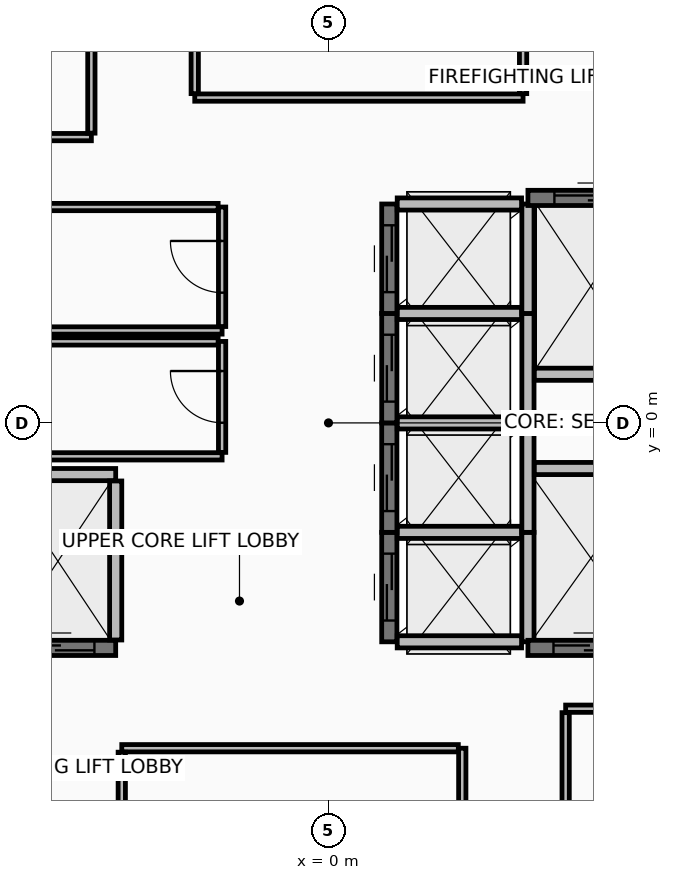
"""IFC4 building model, lengths in metres.
Left out: names, types, materials, properties, quantities, classifications, styles, units other than length and angle.
Written with IfcOpenShell. Run it as: python <this file> out.ifc"""

import sys

from ifc_helpers import new_model, si_unit, direction, frame, frame_2d, origin, place, context, subcontext, project, spatial, rectangle, extrude, element, fill, save


model = new_model("IFC4")
c1 = context("Model", 3, precision=1e-05, world=origin(), true_north=direction((0.0, 1.0)))
c2 = subcontext(c1, "Body", "Model", "MODEL_VIEW")
j1 = project(units=[si_unit("LENGTHUNIT", "METRE"), si_unit("PLANEANGLEUNIT", "RADIAN")], contexts=[c1])
p1 = place(None, origin())
s1 = spatial("IfcSite", under=j1, at=p1, CompositionType="ELEMENT")
p2 = place(p1, origin())
s2 = spatial("IfcBuilding", under=s1, at=p2, CompositionType="ELEMENT")
p3 = place(p2, frame((0.0, 0.0, 237.85)))
s3 = spatial("IfcBuildingStorey", under=s2, at=p3, CompositionType="ELEMENT", Elevation=237.85)
p4 = place(p3, frame((1.0, -3.6, 0.0), z_axis=(0.0, 0.0, 1.0), x_axis=(0.0, 1.0, 0.0)))
e1 = element("IfcWall", 1, at=p4, inside=s3, PredefinedType="SHEAR", context=c2, shape_type="SweptSolid", body=[
    extrude(rectangle(XDim=1.8, YDim=0.25, at=frame_2d((0.9, 0.0))), origin(), (0.0, 0.0, 1.0), 3.42),
])
p5 = place(p4, frame((0.35, 0.0, 0.0)))
e2 = element("IfcOpeningElement", 2, at=p5, cuts=e1, PredefinedType="OPENING", context=c2, shape_type="SweptSolid", body=[
    extrude(rectangle(XDim=1.1, YDim=2.2, at=frame_2d((0.55, 1.1))), frame((0.0, 0.135, 0.0), z_axis=(0.0, -1.0, 0.0), x_axis=(1.0, 0.0, 0.0)), (0.0, 0.0, 1.0), 0.27),
])
p6 = place(p3, frame((3.28, -3.6, 0.0), z_axis=(0.0, 0.0, 1.0), x_axis=(0.0, 1.0, 0.0)))
e3 = element("IfcWall", 3, at=p6, inside=s3, PredefinedType="PARTITIONING", context=c2, shape_type="SweptSolid", body=[
    extrude(rectangle(XDim=1.8, YDim=0.2, at=frame_2d((0.9, 0.0))), origin(), (0.0, 0.0, 1.0), 3.42),
])
for number, where, z_axis, x_axis in (
    (4, (1.13, -3.6, 0.0), (0.0, 0.0, 1.0), (1.0, 0.0, 0.0)),
    (5, (1.13, -1.8, 0.0), (0.0, 0.0, 1.0), (1.0, 0.0, 0.0)),
):
    element("IfcWall", number, at=place(p3, frame(where, z_axis=z_axis, x_axis=x_axis)), inside=s3, PredefinedType="PARTITIONING", context=c2, shape_type="SweptSolid", body=[
        extrude(rectangle(XDim=2.045, YDim=0.2, at=frame_2d((1.022, 0.0))), origin(), (0.0, 0.0, 1.0), 3.42),
    ])
p7 = place(p3, frame((1.0, -1.8, 0.0), z_axis=(0.0, 0.0, 1.0), x_axis=(0.0, 1.0, 0.0)))
e6 = element("IfcWall", 6, at=p7, inside=s3, PredefinedType="SHEAR", context=c2, shape_type="SweptSolid", body=[
    extrude(rectangle(XDim=1.8, YDim=0.25, at=frame_2d((0.9, 0.0))), origin(), (0.0, 0.0, 1.0), 3.42),
])
p8 = place(p7, frame((0.35, 0.0, 0.0)))
e7 = element("IfcOpeningElement", 7, at=p8, cuts=e6, PredefinedType="OPENING", context=c2, shape_type="SweptSolid", body=[
    extrude(rectangle(XDim=1.1, YDim=2.2, at=frame_2d((0.55, 1.1))), frame((0.0, 0.135, 0.0), z_axis=(0.0, -1.0, 0.0), x_axis=(1.0, 0.0, 0.0)), (0.0, 0.0, 1.0), 0.27),
])
p9 = place(p3, frame((3.28, -1.8, 0.0), z_axis=(0.0, 0.0, 1.0), x_axis=(0.0, 1.0, 0.0)))
e8 = element("IfcWall", 8, at=p9, inside=s3, PredefinedType="PARTITIONING", context=c2, shape_type="SweptSolid", body=[
    extrude(rectangle(XDim=1.8, YDim=0.2, at=frame_2d((0.9, 0.0))), origin(), (0.0, 0.0, 1.0), 3.42),
])
p10 = place(p3, frame((1.13, 0.0, 0.0), z_axis=(0.0, 0.0, 1.0), x_axis=(1.0, 0.0, 0.0)))
e9 = element("IfcWall", 9, at=p10, inside=s3, PredefinedType="PARTITIONING", context=c2, shape_type="SweptSolid", body=[
    extrude(rectangle(XDim=2.045, YDim=0.2, at=frame_2d((1.022, 0.0))), origin(), (0.0, 0.0, 1.0), 3.42),
])
p11 = place(p3, frame((1.0, 0.0, 0.0), z_axis=(0.0, 0.0, 1.0), x_axis=(0.0, 1.0, 0.0)))
e10 = element("IfcWall", 10, at=p11, inside=s3, PredefinedType="SHEAR", context=c2, shape_type="SweptSolid", body=[
    extrude(rectangle(XDim=1.8, YDim=0.25, at=frame_2d((0.9, 0.0))), origin(), (0.0, 0.0, 1.0), 3.42),
])
p12 = place(p11, frame((0.35, 0.0, 0.0)))
e11 = element("IfcOpeningElement", 11, at=p12, cuts=e10, PredefinedType="OPENING", context=c2, shape_type="SweptSolid", body=[
    extrude(rectangle(XDim=1.1, YDim=2.2, at=frame_2d((0.55, 1.1))), frame((0.0, 0.135, 0.0), z_axis=(0.0, -1.0, 0.0), x_axis=(1.0, 0.0, 0.0)), (0.0, 0.0, 1.0), 0.27),
])
p13 = place(p3, frame((3.28, 0.0, 0.0), z_axis=(0.0, 0.0, 1.0), x_axis=(0.0, 1.0, 0.0)))
e12 = element("IfcWall", 12, at=p13, inside=s3, PredefinedType="PARTITIONING", context=c2, shape_type="SweptSolid", body=[
    extrude(rectangle(XDim=1.8, YDim=0.2, at=frame_2d((0.9, 0.0))), origin(), (0.0, 0.0, 1.0), 3.42),
])
p14 = place(p3, frame((1.13, 1.8, 0.0), z_axis=(0.0, 0.0, 1.0), x_axis=(1.0, 0.0, 0.0)))
e13 = element("IfcWall", 13, at=p14, inside=s3, PredefinedType="PARTITIONING", context=c2, shape_type="SweptSolid", body=[
    extrude(rectangle(XDim=2.045, YDim=0.2, at=frame_2d((1.022, 0.0))), origin(), (0.0, 0.0, 1.0), 3.42),
])
p15 = place(p3, frame((1.0, 1.8, 0.0), z_axis=(0.0, 0.0, 1.0), x_axis=(0.0, 1.0, 0.0)))
e14 = element("IfcWall", 14, at=p15, inside=s3, PredefinedType="SHEAR", context=c2, shape_type="SweptSolid", body=[
    extrude(rectangle(XDim=1.8, YDim=0.25, at=frame_2d((0.9, 0.0))), origin(), (0.0, 0.0, 1.0), 3.42),
])
p16 = place(p15, frame((0.35, 0.0, 0.0)))
e15 = element("IfcOpeningElement", 15, at=p16, cuts=e14, PredefinedType="OPENING", context=c2, shape_type="SweptSolid", body=[
    extrude(rectangle(XDim=1.1, YDim=2.2, at=frame_2d((0.55, 1.1))), frame((0.0, 0.135, 0.0), z_axis=(0.0, -1.0, 0.0), x_axis=(1.0, 0.0, 0.0)), (0.0, 0.0, 1.0), 0.27),
])
p17 = place(p3, frame((3.28, 1.8, 0.0), z_axis=(0.0, 0.0, 1.0), x_axis=(0.0, 1.0, 0.0)))
e16 = element("IfcWall", 16, at=p17, inside=s3, PredefinedType="PARTITIONING", context=c2, shape_type="SweptSolid", body=[
    extrude(rectangle(XDim=1.8, YDim=0.2, at=frame_2d((0.9, 0.0))), origin(), (0.0, 0.0, 1.0), 3.42),
])
p18 = place(p3, frame((1.13, 3.6, 0.0), z_axis=(0.0, 0.0, 1.0), x_axis=(1.0, 0.0, 0.0)))
e17 = element("IfcWall", 17, at=p18, inside=s3, PredefinedType="PARTITIONING", context=c2, shape_type="SweptSolid", body=[
    extrude(rectangle(XDim=2.045, YDim=0.2, at=frame_2d((1.022, 0.0))), origin(), (0.0, 0.0, 1.0), 2.715),
])
p19 = place(p3, frame((-5.4, -3.7, 0.0), z_axis=(0.0, 0.0, 1.0), x_axis=(1.0, 0.0, 0.0)))
e18 = element("IfcWall", 18, at=p19, inside=s3, PredefinedType="SHEAR", context=c2, shape_type="SweptSolid", body=[
    extrude(rectangle(XDim=1.9, YDim=0.25, at=frame_2d((0.95, 0.0))), origin(), (0.0, 0.0, 1.0), 3.42),
])
p20 = place(p19, frame((0.35, 0.0, 0.0)))
e19 = element("IfcOpeningElement", 19, at=p20, cuts=e18, PredefinedType="OPENING", context=c2, shape_type="SweptSolid", body=[
    extrude(rectangle(XDim=1.2, YDim=2.2, at=frame_2d((0.6, 1.1))), frame((0.0, 0.135, 0.0), z_axis=(0.0, -1.0, 0.0), x_axis=(1.0, 0.0, 0.0)), (0.0, 0.0, 1.0), 0.27),
])
p21 = place(p3, frame((-5.27, -0.85, 0.0), z_axis=(0.0, 0.0, 1.0), x_axis=(1.0, 0.0, 0.0)))
e20 = element("IfcWall", 20, at=p21, inside=s3, PredefinedType="PARTITIONING", context=c2, shape_type="SweptSolid", body=[
    extrude(rectangle(XDim=1.77, YDim=0.2, at=frame_2d((0.885, 0.0))), origin(), (0.0, 0.0, 1.0), 3.42),
])
p22 = place(p3, frame((-3.5, -3.57, 0.0), z_axis=(0.0, 0.0, 1.0), x_axis=(0.0, 1.0, 0.0)))
e21 = element("IfcWall", 21, at=p22, inside=s3, PredefinedType="PARTITIONING", context=c2, shape_type="SweptSolid", body=[
    extrude(rectangle(XDim=2.615, YDim=0.2, at=frame_2d((1.308, 0.0))), origin(), (0.0, 0.0, 1.0), 3.42),
])
p23 = place(p3, frame((3.28, 3.7, 0.0), z_axis=(0.0, 0.0, 1.0), x_axis=(1.0, 0.0, 0.0)))
e22 = element("IfcWall", 22, at=p23, inside=s3, PredefinedType="SHEAR", context=c2, shape_type="SweptSolid", body=[
    extrude(rectangle(XDim=2.07, YDim=0.25, at=frame_2d((1.035, 0.0))), origin(), (0.0, 0.0, 1.0), 3.42),
])
p24 = place(p23, frame((0.435, 0.0, 0.0)))
e23 = element("IfcOpeningElement", 23, at=p24, cuts=e22, PredefinedType="OPENING", context=c2, shape_type="SweptSolid", body=[
    extrude(rectangle(XDim=1.2, YDim=2.2, at=frame_2d((0.6, 1.1))), frame((0.0, 0.135, 0.0), z_axis=(0.0, -1.0, 0.0), x_axis=(1.0, 0.0, 0.0)), (0.0, 0.0, 1.0), 0.27),
])
p25 = place(p3, frame((3.385, 0.8, 0.0), z_axis=(0.0, 0.0, 1.0), x_axis=(1.0, 0.0, 0.0)))
e24 = element("IfcWall", 24, at=p25, inside=s3, PredefinedType="PARTITIONING", context=c2, shape_type="SweptSolid", body=[
    extrude(rectangle(XDim=1.835, YDim=0.2, at=frame_2d((0.917, 0.0))), origin(), (0.0, 0.0, 1.0), 3.42),
])
p26 = place(p3, frame((3.28, -3.7, 0.0), z_axis=(0.0, 0.0, 1.0), x_axis=(1.0, 0.0, 0.0)))
e25 = element("IfcWall", 25, at=p26, inside=s3, PredefinedType="SHEAR", context=c2, shape_type="SweptSolid", body=[
    extrude(rectangle(XDim=1.94, YDim=0.25, at=frame_2d((0.97, 0.0))), origin(), (0.0, 0.0, 1.0), 3.42),
])
p27 = place(p26, frame((0.42, 0.0, 0.0)))
e26 = element("IfcOpeningElement", 26, at=p27, cuts=e25, PredefinedType="OPENING", context=c2, shape_type="SweptSolid", body=[
    extrude(rectangle(XDim=1.1, YDim=2.2, at=frame_2d((0.55, 1.1))), frame((0.0, 0.135, 0.0), z_axis=(0.0, -1.0, 0.0), x_axis=(1.0, 0.0, 0.0)), (0.0, 0.0, 1.0), 0.27),
])
p28 = place(p3, frame((3.385, -0.75, 0.0), z_axis=(0.0, 0.0, 1.0), x_axis=(1.0, 0.0, 0.0)))
e27 = element("IfcWall", 27, at=p28, inside=s3, PredefinedType="PARTITIONING", context=c2, shape_type="SweptSolid", body=[
    extrude(rectangle(XDim=1.835, YDim=0.2, at=frame_2d((0.917, 0.0))), origin(), (0.0, 0.0, 1.0), 3.42),
])
p29 = place(p3, frame((-5.22, 1.52, 0.0), z_axis=(0.0, 0.0, 1.0), x_axis=(1.0, 0.0, 0.0)))
e28 = element("IfcWall", 28, at=p29, inside=s3, PredefinedType="PARTITIONING", context=c2, shape_type="SweptSolid", body=[
    extrude(rectangle(XDim=3.47, YDim=0.12, at=frame_2d((1.735, 0.0))), origin(), (0.0, 0.0, 1.0), 3.42),
])
p30 = place(p3, frame((-1.75, 1.585, 0.0), z_axis=(0.0, 0.0, 1.0), x_axis=(0.0, 1.0, 0.0)))
e29 = element("IfcWall", 29, at=p30, inside=s3, PredefinedType="PARTITIONING", context=c2, shape_type="SweptSolid", body=[
    extrude(rectangle(XDim=1.965, YDim=0.12, at=frame_2d((0.982, 0.0))), origin(), (0.0, 0.0, 1.0), 3.42),
])
p31 = place(p30, frame((0.557, 0.0, 0.0)))
e30 = element("IfcOpeningElement", 30, at=p31, cuts=e29, PredefinedType="OPENING", context=c2, shape_type="SweptSolid", body=[
    extrude(rectangle(XDim=0.85, YDim=2.1, at=frame_2d((0.425, 1.05))), frame((0.0, 0.07, 0.0), z_axis=(0.0, -1.0, 0.0), x_axis=(1.0, 0.0, 0.0)), (0.0, 0.0, 1.0), 0.14),
])
p32 = place(p3, frame((-1.815, 3.55, 0.0), z_axis=(0.0, 0.0, 1.0), x_axis=(-1.0, 0.0, 0.0)))
e31 = element("IfcWall", 31, at=p32, inside=s3, PredefinedType="PARTITIONING", context=c2, shape_type="SweptSolid", body=[
    extrude(rectangle(XDim=3.405, YDim=0.12, at=frame_2d((1.703, 0.0))), origin(), (0.0, 0.0, 1.0), 3.42),
])
p33 = place(p3, frame((-5.22, -0.55, 0.0), z_axis=(0.0, 0.0, 1.0), x_axis=(1.0, 0.0, 0.0)))
e32 = element("IfcWall", 32, at=p33, inside=s3, PredefinedType="PARTITIONING", context=c2, shape_type="SweptSolid", body=[
    extrude(rectangle(XDim=3.47, YDim=0.12, at=frame_2d((1.735, 0.0))), origin(), (0.0, 0.0, 1.0), 3.42),
])
p34 = place(p3, frame((-1.75, -0.485, 0.0), z_axis=(0.0, 0.0, 1.0), x_axis=(0.0, 1.0, 0.0)))
e33 = element("IfcWall", 33, at=p34, inside=s3, PredefinedType="PARTITIONING", context=c2, shape_type="SweptSolid", body=[
    extrude(rectangle(XDim=1.825, YDim=0.12, at=frame_2d((0.913, 0.0))), origin(), (0.0, 0.0, 1.0), 3.42),
])
p35 = place(p34, frame((0.488, 0.0, 0.0)))
e34 = element("IfcOpeningElement", 34, at=p35, cuts=e33, PredefinedType="OPENING", context=c2, shape_type="SweptSolid", body=[
    extrude(rectangle(XDim=0.85, YDim=2.1, at=frame_2d((0.425, 1.05))), frame((0.0, 0.07, 0.0), z_axis=(0.0, -1.0, 0.0), x_axis=(1.0, 0.0, 0.0)), (0.0, 0.0, 1.0), 0.14),
])
p36 = place(p3, frame((-1.815, 1.34, 0.0), z_axis=(0.0, 0.0, 1.0), x_axis=(-1.0, 0.0, 0.0)))
e35 = element("IfcWall", 35, at=p36, inside=s3, PredefinedType="PARTITIONING", context=c2, shape_type="SweptSolid", body=[
    extrude(rectangle(XDim=3.405, YDim=0.12, at=frame_2d((1.703, 0.0))), origin(), (0.0, 0.0, 1.0), 3.42),
])
p37 = place(p3, frame((2.2, -7.42, 0.0), z_axis=(0.0, 0.0, 1.0), x_axis=(0.0, 1.0, 0.0)))
e36 = element("IfcWall", 36, at=p37, inside=s3, PredefinedType="PARTITIONING", context=c2, shape_type="SweptSolid", body=[
    extrude(rectangle(XDim=2.07, YDim=0.12, at=frame_2d((1.035, 0.0))), origin(), (0.0, 0.0, 1.0), 2.715),
])
p38 = place(p3, frame((2.135, -5.35, 0.0), z_axis=(0.0, 0.0, 1.0), x_axis=(-1.0, 0.0, 0.0)))
e37 = element("IfcWall", 37, at=p38, inside=s3, PredefinedType="PARTITIONING", context=c2, shape_type="SweptSolid", body=[
    extrude(rectangle(XDim=5.535, YDim=0.12, at=frame_2d((2.768, 0.0))), origin(), (0.0, 0.0, 1.0), 2.715),
])
p39 = place(p3, frame((-3.4, -5.415, 0.0), z_axis=(0.0, 0.0, 1.0), x_axis=(0.0, -1.0, 0.0)))
e38 = element("IfcWall", 38, at=p39, inside=s3, PredefinedType="PARTITIONING", context=c2, shape_type="SweptSolid", body=[
    extrude(rectangle(XDim=2.8, YDim=0.12, at=frame_2d((1.4, 0.0))), origin(), (0.0, 0.0, 1.0), 2.715),
])
p40 = place(p3, frame((-2.2, 5.35, 0.0), z_axis=(0.0, 0.0, 1.0), x_axis=(1.0, 0.0, 0.0)))
e39 = element("IfcWall", 39, at=p40, inside=s3, PredefinedType="PARTITIONING", context=c2, shape_type="SweptSolid", body=[
    extrude(rectangle(XDim=5.4, YDim=0.12, at=frame_2d((2.7, 0.0))), origin(), (0.0, 0.0, 1.0), 2.715),
])
p41 = place(p3, frame((3.2, 5.415, 0.0), z_axis=(0.0, 0.0, 1.0), x_axis=(0.0, 1.0, 0.0)))
e40 = element("IfcWall", 40, at=p41, inside=s3, PredefinedType="PARTITIONING", context=c2, shape_type="SweptSolid", body=[
    extrude(rectangle(XDim=2.8, YDim=0.12, at=frame_2d((1.4, 0.0))), origin(), (0.0, 0.0, 1.0), 2.715),
])
p42 = place(p3, frame((-2.2, 7.42, 0.0), z_axis=(0.0, 0.0, 1.0), x_axis=(0.0, -1.0, 0.0)))
e41 = element("IfcWall", 41, at=p42, inside=s3, PredefinedType="PARTITIONING", context=c2, shape_type="SweptSolid", body=[
    extrude(rectangle(XDim=2.005, YDim=0.12, at=frame_2d((1.002, 0.0))), origin(), (0.0, 0.0, 1.0), 2.715),
])
p43 = place(p3, frame((-5.35, 4.7, 0.0), z_axis=(0.0, 0.0, 1.0), x_axis=(1.0, 0.0, 0.0)))
e42 = element("IfcWall", 42, at=p43, inside=s3, PredefinedType="PARTITIONING", context=c2, shape_type="SweptSolid", body=[
    extrude(rectangle(XDim=1.45, YDim=0.12, at=frame_2d((0.725, 0.0))), origin(), (0.0, 0.0, 1.0), 3.42),
])
p44 = place(p3, frame((-3.9, 4.765, 0.0), z_axis=(0.0, 0.0, 1.0), x_axis=(0.0, 1.0, 0.0)))
e43 = element("IfcWall", 43, at=p44, inside=s3, PredefinedType="PARTITIONING", context=c2, shape_type="SweptSolid", body=[
    extrude(rectangle(XDim=3.45, YDim=0.12, at=frame_2d((1.725, 0.0))), origin(), (0.0, 0.0, 1.0), 2.715),
])
p45 = place(p3, frame((5.785, -4.7, 0.0), z_axis=(0.0, 0.0, 1.0), x_axis=(-1.0, 0.0, 0.0)))
e44 = element("IfcWall", 44, at=p45, inside=s3, PredefinedType="PARTITIONING", context=c2, shape_type="SweptSolid", body=[
    extrude(rectangle(XDim=1.885, YDim=0.12, at=frame_2d((0.942, 0.0))), origin(), (0.0, 0.0, 1.0), 3.42),
])
p46 = place(p3, frame((3.9, -4.765, 0.0), z_axis=(0.0, 0.0, 1.0), x_axis=(0.0, -1.0, 0.0)))
e45 = element("IfcWall", 45, at=p46, inside=s3, PredefinedType="PARTITIONING", context=c2, shape_type="SweptSolid", body=[
    extrude(rectangle(XDim=3.45, YDim=0.12, at=frame_2d((1.725, 0.0))), origin(), (0.0, 0.0, 1.0), 2.715),
])
p47 = place(p5, origin())
e46 = element("IfcDoor", 46, at=p47, inside=s3, OperationType="SLIDING_TO_LEFT", PredefinedType="DOOR", context=c2, shape_type="SweptSolid", body=[
    extrude(rectangle(XDim=1.1, YDim=2.2, at=frame_2d((0.55, 1.1))), frame((0.0, 0.025, 0.0), z_axis=(0.0, -1.0, 0.0), x_axis=(1.0, 0.0, 0.0)), (0.0, 0.0, 1.0), 0.05),
])
fill(e2, e46)
p48 = place(p8, origin())
e47 = element("IfcDoor", 47, at=p48, inside=s3, OperationType="SLIDING_TO_LEFT", PredefinedType="DOOR", context=c2, shape_type="SweptSolid", body=[
    extrude(rectangle(XDim=1.1, YDim=2.2, at=frame_2d((0.55, 1.1))), frame((0.0, 0.025, 0.0), z_axis=(0.0, -1.0, 0.0), x_axis=(1.0, 0.0, 0.0)), (0.0, 0.0, 1.0), 0.05),
])
fill(e7, e47)
p49 = place(p12, origin())
e48 = element("IfcDoor", 48, at=p49, inside=s3, OperationType="SLIDING_TO_LEFT", PredefinedType="DOOR", context=c2, shape_type="SweptSolid", body=[
    extrude(rectangle(XDim=1.1, YDim=2.2, at=frame_2d((0.55, 1.1))), frame((0.0, 0.025, 0.0), z_axis=(0.0, -1.0, 0.0), x_axis=(1.0, 0.0, 0.0)), (0.0, 0.0, 1.0), 0.05),
])
fill(e11, e48)
p50 = place(p16, origin())
e49 = element("IfcDoor", 49, at=p50, inside=s3, OperationType="SLIDING_TO_LEFT", PredefinedType="DOOR", context=c2, shape_type="SweptSolid", body=[
    extrude(rectangle(XDim=1.1, YDim=2.2, at=frame_2d((0.55, 1.1))), frame((0.0, 0.025, 0.0), z_axis=(0.0, -1.0, 0.0), x_axis=(1.0, 0.0, 0.0)), (0.0, 0.0, 1.0), 0.05),
])
fill(e15, e49)
p51 = place(p20, origin())
e50 = element("IfcDoor", 50, at=p51, inside=s3, OperationType="SLIDING_TO_RIGHT", PredefinedType="DOOR", context=c2, shape_type="SweptSolid", body=[
    extrude(rectangle(XDim=1.2, YDim=2.2, at=frame_2d((0.6, 1.1))), frame((0.0, 0.025, 0.0), z_axis=(0.0, -1.0, 0.0), x_axis=(1.0, 0.0, 0.0)), (0.0, 0.0, 1.0), 0.05),
])
fill(e19, e50)
p52 = place(p24, origin())
e51 = element("IfcDoor", 51, at=p52, inside=s3, OperationType="SLIDING_TO_RIGHT", PredefinedType="DOOR", context=c2, shape_type="SweptSolid", body=[
    extrude(rectangle(XDim=1.2, YDim=2.2, at=frame_2d((0.6, 1.1))), frame((0.0, 0.025, 0.0), z_axis=(0.0, -1.0, 0.0), x_axis=(1.0, 0.0, 0.0)), (0.0, 0.0, 1.0), 0.05),
])
fill(e23, e51)
p53 = place(p27, origin())
e52 = element("IfcDoor", 52, at=p53, inside=s3, OperationType="SLIDING_TO_LEFT", PredefinedType="DOOR", context=c2, shape_type="SweptSolid", body=[
    extrude(rectangle(XDim=1.1, YDim=2.2, at=frame_2d((0.55, 1.1))), frame((0.0, 0.025, 0.0), z_axis=(0.0, -1.0, 0.0), x_axis=(1.0, 0.0, 0.0)), (0.0, 0.0, 1.0), 0.05),
])
fill(e26, e52)
p54 = place(p31, frame((0.85, 0.0, 0.0), z_axis=(0.0, 0.0, 1.0), x_axis=(-1.0, 0.0, 0.0)))
e53 = element("IfcDoor", 53, at=p54, inside=s3, OperationType="SINGLE_SWING_RIGHT", PredefinedType="DOOR", context=c2, shape_type="SweptSolid", body=[
    extrude(rectangle(XDim=0.85, YDim=2.1, at=frame_2d((0.425, 1.05))), frame((0.0, 0.025, 0.0), z_axis=(0.0, -1.0, 0.0), x_axis=(1.0, 0.0, 0.0)), (0.0, 0.0, 1.0), 0.05),
])
fill(e30, e53)
p55 = place(p35, frame((0.85, 0.0, 0.0), z_axis=(0.0, 0.0, 1.0), x_axis=(-1.0, 0.0, 0.0)))
e54 = element("IfcDoor", 54, at=p55, inside=s3, OperationType="SINGLE_SWING_RIGHT", PredefinedType="DOOR", context=c2, shape_type="SweptSolid", body=[
    extrude(rectangle(XDim=0.85, YDim=2.1, at=frame_2d((0.425, 1.05))), frame((0.0, 0.025, 0.0), z_axis=(0.0, -1.0, 0.0), x_axis=(1.0, 0.0, 0.0)), (0.0, 0.0, 1.0), 0.05),
])
fill(e34, e54)
save(model, sys.argv[1])
